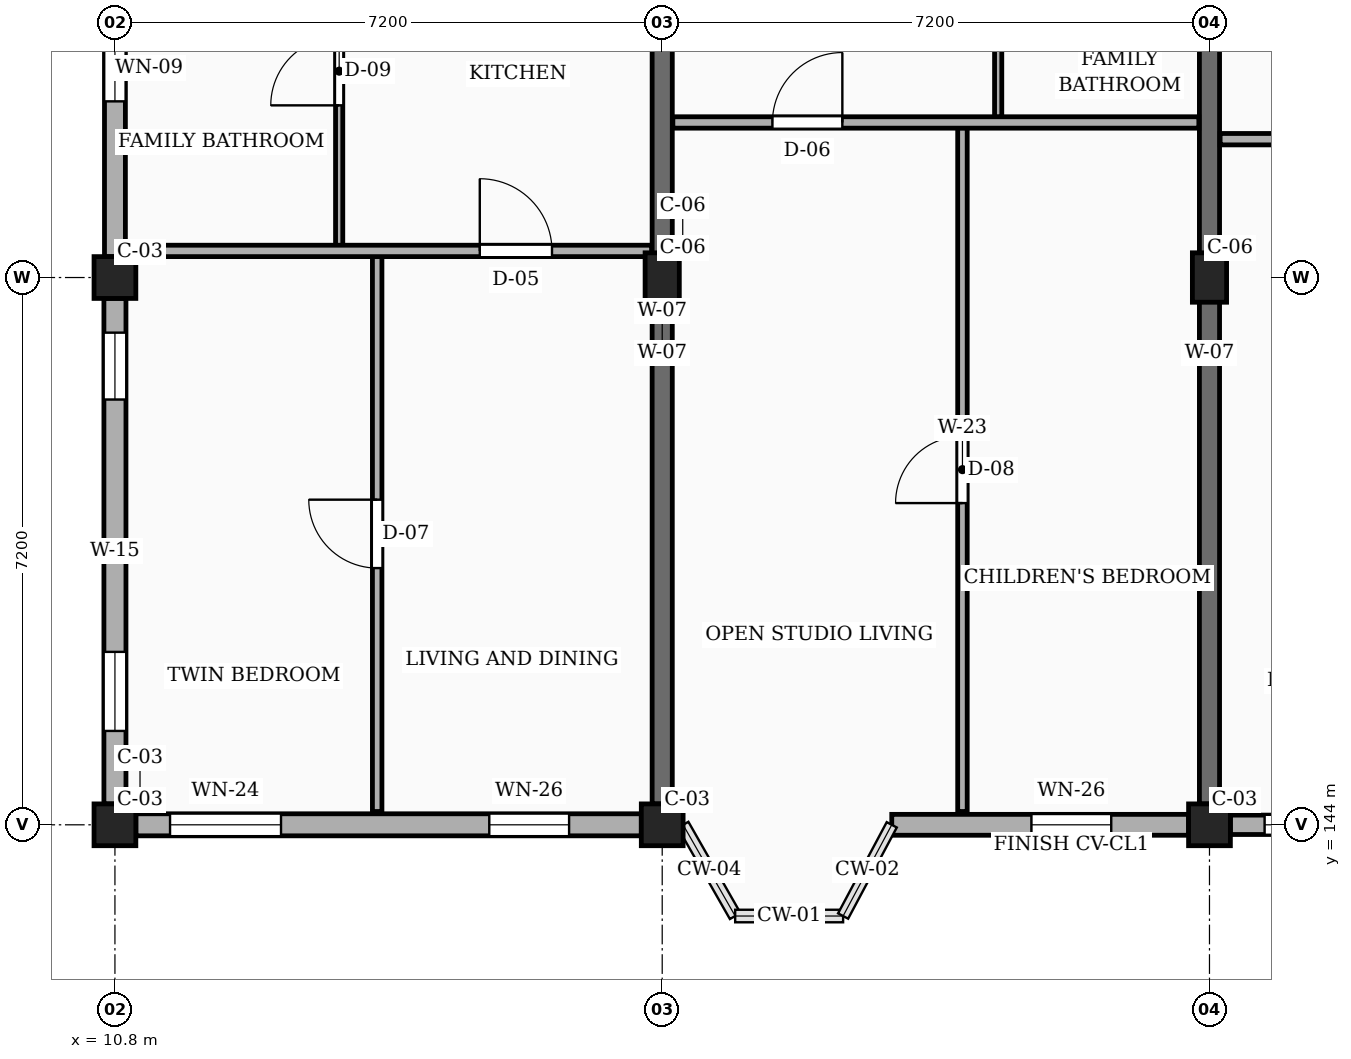
"""IFC4 building model, lengths in metres.
Left out: names, types, materials, properties, quantities, classifications, styles, units other than length and angle.
Written with IfcOpenShell. Run it as: python <this file> out.ifc"""

import sys

from ifc_helpers import new_model, si_unit, direction, frame, frame_2d, origin, origin_2d, place, context, subcontext, project, spatial, rectangle, extrude, element, fill, save


model = new_model("IFC4")
c1 = context("Model", 3, precision=1e-05, world=origin(), true_north=direction((0.0, 1.0)))
c2 = subcontext(c1, "Body", "Model", "MODEL_VIEW")
j1 = project(units=[si_unit("LENGTHUNIT", "METRE"), si_unit("PLANEANGLEUNIT", "RADIAN")], contexts=[c1])
p1 = place(None, origin())
s1 = spatial("IfcSite", under=j1, at=p1, CompositionType="ELEMENT")
p2 = place(p1, origin())
s2 = spatial("IfcBuilding", under=s1, at=p2, CompositionType="ELEMENT")
p3 = place(p2, frame((0.0, 0.0, 10.8)))
s3 = spatial("IfcBuildingStorey", under=s2, at=p3, CompositionType="ELEMENT", Elevation=10.8)
for number, where, z_axis, x_axis in (
    (1, (10.8, 144.0, 0.0), (0.0, 0.0, 1.0), (1.0, 0.0, 0.0)),
    (2, (10.8, 151.2, 0.0), (0.0, 0.0, 1.0), (1.0, 0.0, 0.0)),
    (3, (18.0, 144.0, 0.0), (0.0, 0.0, 1.0), (1.0, 0.0, 0.0)),
):
    element("IfcColumn", number, at=place(p3, frame(where, z_axis=z_axis, x_axis=x_axis)), inside=s3, PredefinedType="COLUMN", context=c2, shape_type="SweptSolid", body=[
        extrude(rectangle(XDim=0.55, YDim=0.55, at=origin_2d()), origin(), (0.0, 0.0, 1.0), 3.15),
    ])
p4 = place(p3, frame((18.0, 151.2, 0.0), z_axis=(0.0, 0.0, 1.0), x_axis=(1.0, 0.0, 0.0)))
e4 = element("IfcColumn", 4, at=p4, inside=s3, PredefinedType="COLUMN", context=c2, shape_type="SweptSolid", body=[
    extrude(rectangle(XDim=0.45, YDim=0.65, at=origin_2d()), origin(), (0.0, 0.0, 1.0), 3.15),
])
p5 = place(p3, frame((25.2, 144.0, 0.0), z_axis=(0.0, 0.0, 1.0), x_axis=(1.0, 0.0, 0.0)))
e5 = element("IfcColumn", 5, at=p5, inside=s3, PredefinedType="COLUMN", context=c2, shape_type="SweptSolid", body=[
    extrude(rectangle(XDim=0.55, YDim=0.55, at=origin_2d()), origin(), (0.0, 0.0, 1.0), 3.15),
])
p6 = place(p3, frame((25.2, 151.2, 0.0), z_axis=(0.0, 0.0, 1.0), x_axis=(1.0, 0.0, 0.0)))
e6 = element("IfcColumn", 6, at=p6, inside=s3, PredefinedType="COLUMN", context=c2, shape_type="SweptSolid", body=[
    extrude(rectangle(XDim=0.45, YDim=0.65, at=origin_2d()), origin(), (0.0, 0.0, 1.0), 3.15),
])
for number, where, z_axis, x_axis in (
    (7, (18.0, 144.275, 0.0), (0.0, 0.0, 1.0), (0.0, 1.0, 0.0)),
    (8, (25.2, 144.275, 0.0), (0.0, 0.0, 1.0), (0.0, 1.0, 0.0)),
):
    element("IfcWall", number, at=place(p3, frame(where, z_axis=z_axis, x_axis=x_axis)), inside=s3, PredefinedType="SOLIDWALL", context=c2, shape_type="SweptSolid", body=[
        extrude(rectangle(XDim=11.875, YDim=0.265, at=frame_2d((5.938, 0.0))), origin(), (0.0, 0.0, 1.0), 2.185),
    ])
p7 = place(p3, frame((11.075, 144.0, 0.0), z_axis=(0.0, 0.0, 1.0), x_axis=(1.0, 0.0, 0.0)))
e9 = element("IfcWall", 9, at=p7, inside=s3, PredefinedType="SOLIDWALL", context=c2, shape_type="SweptSolid", body=[
    extrude(rectangle(XDim=6.65, YDim=0.29, at=frame_2d((3.325, 0.0))), origin(), (0.0, 0.0, 1.0), 2.455),
])
p8 = place(p7, frame((0.45, 0.0, 0.78)))
e10 = element("IfcOpeningElement", 10, at=p8, cuts=e9, PredefinedType="OPENING", context=c2, shape_type="SweptSolid", body=[
    extrude(rectangle(XDim=1.46, YDim=1.36, at=frame_2d((0.73, 0.68))), frame((0.0, 0.155, 0.0), z_axis=(0.0, -1.0, 0.0), x_axis=(1.0, 0.0, 0.0)), (0.0, 0.0, 1.0), 0.31),
])
p9 = place(p7, frame((4.65, 0.0, 0.78)))
e11 = element("IfcOpeningElement", 11, at=p9, cuts=e9, PredefinedType="OPENING", context=c2, shape_type="SweptSolid", body=[
    extrude(rectangle(XDim=1.05, YDim=1.44, at=frame_2d((0.525, 0.72))), frame((0.0, 0.155, 0.0), z_axis=(0.0, -1.0, 0.0), x_axis=(1.0, 0.0, 0.0)), (0.0, 0.0, 1.0), 0.31),
])
p10 = place(p3, frame((21.02, 144.0, 0.0), z_axis=(0.0, 0.0, 1.0), x_axis=(1.0, 0.0, 0.0)))
e12 = element("IfcWall", 12, at=p10, inside=s3, PredefinedType="SOLIDWALL", context=c2, shape_type="SweptSolid", body=[
    extrude(rectangle(XDim=3.905, YDim=0.275, at=frame_2d((1.953, 0.0))), origin(), (0.0, 0.0, 1.0), 2.455),
])
p11 = place(p10, frame((1.837, 0.0, 0.78)))
e13 = element("IfcOpeningElement", 13, at=p11, cuts=e12, PredefinedType="OPENING", context=c2, shape_type="SweptSolid", body=[
    extrude(rectangle(XDim=1.05, YDim=1.44, at=frame_2d((0.525, 0.72))), frame((0.0, 0.147, 0.0), z_axis=(0.0, -1.0, 0.0), x_axis=(1.0, 0.0, 0.0)), (0.0, 0.0, 1.0), 0.295),
])
p12 = place(p3, frame((25.475, 144.0, 0.0), z_axis=(0.0, 0.0, 1.0), x_axis=(1.0, 0.0, 0.0)))
e14 = element("IfcWall", 14, at=p12, inside=s3, PredefinedType="SOLIDWALL", context=c2, shape_type="SweptSolid", body=[
    extrude(rectangle(XDim=6.65, YDim=0.255, at=frame_2d((3.325, 0.0))), origin(), (0.0, 0.0, 1.0), 2.455),
])
p13 = place(p12, frame((0.45, 0.0, 0.78)))
e15 = element("IfcOpeningElement", 15, at=p13, cuts=e14, PredefinedType="OPENING", context=c2, shape_type="SweptSolid", body=[
    extrude(rectangle(XDim=1.15, YDim=1.44, at=frame_2d((0.575, 0.72))), frame((0.0, 0.137, 0.0), z_axis=(0.0, -1.0, 0.0), x_axis=(1.0, 0.0, 0.0)), (0.0, 0.0, 1.0), 0.275),
])
p14 = place(p12, frame((4.65, 0.0, 0.78)))
e16 = element("IfcOpeningElement", 16, at=p14, cuts=e14, PredefinedType="OPENING", context=c2, shape_type="SweptSolid", body=[
    extrude(rectangle(XDim=1.35, YDim=1.44, at=frame_2d((0.675, 0.72))), frame((0.0, 0.137, 0.0), z_axis=(0.0, -1.0, 0.0), x_axis=(1.0, 0.0, 0.0)), (0.0, 0.0, 1.0), 0.275),
])
p15 = place(p3, frame((10.8, 158.125, 0.0), z_axis=(0.0, 0.0, 1.0), x_axis=(0.0, -1.0, 0.0)))
e17 = element("IfcWall", 17, at=p15, inside=s3, PredefinedType="SOLIDWALL", context=c2, shape_type="SweptSolid", body=[
    extrude(rectangle(XDim=6.65, YDim=0.275, at=frame_2d((3.325, 0.0))), origin(), (0.0, 0.0, 1.0), 2.455),
])
p16 = place(p15, frame((0.462, 0.0, 0.78)))
e18 = element("IfcOpeningElement", 18, at=p16, cuts=e17, PredefinedType="OPENING", context=c2, shape_type="SweptSolid", body=[
    extrude(rectangle(XDim=1.04, YDim=1.26, at=frame_2d((0.52, 0.63))), frame((0.0, 0.147, 0.0), z_axis=(0.0, -1.0, 0.0), x_axis=(1.0, 0.0, 0.0)), (0.0, 0.0, 1.0), 0.295),
])
p17 = place(p15, frame((3.728, 0.0, 0.78)))
e19 = element("IfcOpeningElement", 19, at=p17, cuts=e17, PredefinedType="OPENING", context=c2, shape_type="SweptSolid", body=[
    extrude(rectangle(XDim=0.88, YDim=1.26, at=frame_2d((0.44, 0.63))), frame((0.0, 0.147, 0.0), z_axis=(0.0, -1.0, 0.0), x_axis=(1.0, 0.0, 0.0)), (0.0, 0.0, 1.0), 0.295),
])
p18 = place(p3, frame((10.8, 150.925, 0.0), z_axis=(0.0, 0.0, 1.0), x_axis=(0.0, -1.0, 0.0)))
e20 = element("IfcWall", 20, at=p18, inside=s3, PredefinedType="SOLIDWALL", context=c2, shape_type="SweptSolid", body=[
    extrude(rectangle(XDim=6.65, YDim=0.29, at=frame_2d((3.325, 0.0))), origin(), (0.0, 0.0, 1.0), 2.455),
])
p19 = place(p18, frame((0.45, 0.0, 0.78)))
e21 = element("IfcOpeningElement", 21, at=p19, cuts=e20, PredefinedType="OPENING", context=c2, shape_type="SweptSolid", body=[
    extrude(rectangle(XDim=0.88, YDim=1.26, at=frame_2d((0.44, 0.63))), frame((0.0, 0.155, 0.0), z_axis=(0.0, -1.0, 0.0), x_axis=(1.0, 0.0, 0.0)), (0.0, 0.0, 1.0), 0.31),
])
p20 = place(p18, frame((4.65, 0.0, 0.78)))
e22 = element("IfcOpeningElement", 22, at=p20, cuts=e20, PredefinedType="OPENING", context=c2, shape_type="SweptSolid", body=[
    extrude(rectangle(XDim=1.04, YDim=1.26, at=frame_2d((0.52, 0.63))), frame((0.0, 0.155, 0.0), z_axis=(0.0, -1.0, 0.0), x_axis=(1.0, 0.0, 0.0)), (0.0, 0.0, 1.0), 0.31),
])
p21 = place(p3, frame((14.25, 144.175, 0.0), z_axis=(0.0, 0.0, 1.0), x_axis=(0.0, 1.0, 0.0)))
e23 = element("IfcWall", 23, at=p21, inside=s3, PredefinedType="PARTITIONING", context=c2, shape_type="SweptSolid", body=[
    extrude(rectangle(XDim=7.305, YDim=0.125, at=frame_2d((3.652, 0.0))), origin(), (0.0, 0.0, 1.0), 2.32),
])
p22 = place(p21, frame((3.202, 0.0, 0.0)))
e24 = element("IfcOpeningElement", 24, at=p22, cuts=e23, PredefinedType="OPENING", context=c2, shape_type="SweptSolid", body=[
    extrude(rectangle(XDim=0.9, YDim=2.1, at=frame_2d((0.45, 1.05))), frame((0.0, 0.073, 0.0), z_axis=(0.0, -1.0, 0.0), x_axis=(1.0, 0.0, 0.0)), (0.0, 0.0, 1.0), 0.145),
])
p23 = place(p3, frame((13.75, 151.62, 0.0), z_axis=(0.0, 0.0, 1.0), x_axis=(0.0, 1.0, 0.0)))
e25 = element("IfcWall", 25, at=p23, inside=s3, PredefinedType="PARTITIONING", context=c2, shape_type="SweptSolid", body=[
    extrude(rectangle(XDim=4.59, YDim=0.095, at=frame_2d((2.295, 0.0))), origin(), (0.0, 0.0, 1.0), 2.32),
])
p24 = place(p23, frame((1.845, 0.0, 0.0)))
e26 = element("IfcOpeningElement", 26, at=p24, cuts=e25, PredefinedType="OPENING", context=c2, shape_type="SweptSolid", body=[
    extrude(rectangle(XDim=0.9, YDim=2.05, at=frame_2d((0.45, 1.025))), frame((0.0, 0.058, 0.0), z_axis=(0.0, -1.0, 0.0), x_axis=(1.0, 0.0, 0.0)), (0.0, 0.0, 1.0), 0.115),
])
p25 = place(p3, frame((10.975, 151.55, 0.0), z_axis=(0.0, 0.0, 1.0), x_axis=(1.0, 0.0, 0.0)))
e27 = element("IfcWall", 27, at=p25, inside=s3, PredefinedType="PARTITIONING", context=c2, shape_type="SweptSolid", body=[
    extrude(rectangle(XDim=6.885, YDim=0.15, at=frame_2d((3.442, 0.0))), origin(), (0.0, 0.0, 1.0), 2.32),
])
p26 = place(p25, frame((4.625, 0.0, 0.0)))
e28 = element("IfcOpeningElement", 28, at=p26, cuts=e27, PredefinedType="OPENING", context=c2, shape_type="SweptSolid", body=[
    extrude(rectangle(XDim=0.95, YDim=2.1, at=frame_2d((0.475, 1.05))), frame((0.0, 0.085, 0.0), z_axis=(0.0, -1.0, 0.0), x_axis=(1.0, 0.0, 0.0)), (0.0, 0.0, 1.0), 0.17),
])
p27 = place(p3, frame((21.95, 144.175, 0.0), z_axis=(0.0, 0.0, 1.0), x_axis=(0.0, 1.0, 0.0)))
e29 = element("IfcWall", 29, at=p27, inside=s3, PredefinedType="PARTITIONING", context=c2, shape_type="SweptSolid", body=[
    extrude(rectangle(XDim=8.995, YDim=0.125, at=frame_2d((4.498, 0.0))), origin(), (0.0, 0.0, 1.0), 2.32),
])
p28 = place(p27, frame((4.058, 0.0, 0.0)))
e30 = element("IfcOpeningElement", 30, at=p28, cuts=e29, PredefinedType="OPENING", context=c2, shape_type="SweptSolid", body=[
    extrude(rectangle(XDim=0.88, YDim=2.08, at=frame_2d((0.44, 1.04))), frame((0.0, 0.073, 0.0), z_axis=(0.0, -1.0, 0.0), x_axis=(1.0, 0.0, 0.0)), (0.0, 0.0, 1.0), 0.145),
])
p29 = place(p3, frame((22.42, 153.31, 0.0), z_axis=(0.0, 0.0, 1.0), x_axis=(0.0, 1.0, 0.0)))
e31 = element("IfcWall", 31, at=p29, inside=s3, PredefinedType="PARTITIONING", context=c2, shape_type="SweptSolid", body=[
    extrude(rectangle(XDim=2.9, YDim=0.095, at=frame_2d((1.45, 0.0))), origin(), (0.0, 0.0, 1.0), 2.32),
])
p30 = place(p29, frame((1.015, 0.0, 0.0)))
e32 = element("IfcOpeningElement", 32, at=p30, cuts=e31, PredefinedType="OPENING", context=c2, shape_type="SweptSolid", body=[
    extrude(rectangle(XDim=0.87, YDim=2.05, at=frame_2d((0.435, 1.025))), frame((0.0, 0.058, 0.0), z_axis=(0.0, -1.0, 0.0), x_axis=(1.0, 0.0, 0.0)), (0.0, 0.0, 1.0), 0.115),
])
p31 = place(p3, frame((18.14, 153.24, 0.0), z_axis=(0.0, 0.0, 1.0), x_axis=(1.0, 0.0, 0.0)))
e33 = element("IfcWall", 33, at=p31, inside=s3, PredefinedType="PARTITIONING", context=c2, shape_type="SweptSolid", body=[
    extrude(rectangle(XDim=6.92, YDim=0.15, at=frame_2d((3.46, 0.0))), origin(), (0.0, 0.0, 1.0), 2.32),
])
p32 = place(p31, frame((1.31, 0.0, 0.0)))
e34 = element("IfcOpeningElement", 34, at=p32, cuts=e33, PredefinedType="OPENING", context=c2, shape_type="SweptSolid", body=[
    extrude(rectangle(XDim=0.92, YDim=2.1, at=frame_2d((0.46, 1.05))), frame((0.0, 0.085, 0.0), z_axis=(0.0, -1.0, 0.0), x_axis=(1.0, 0.0, 0.0)), (0.0, 0.0, 1.0), 0.17),
])
p33 = place(p3, frame((25.34, 153.02, 0.0), z_axis=(0.0, 0.0, 1.0), x_axis=(1.0, 0.0, 0.0)))
e35 = element("IfcWall", 35, at=p33, inside=s3, PredefinedType="PARTITIONING", context=c2, shape_type="SweptSolid", body=[
    extrude(rectangle(XDim=6.92, YDim=0.15, at=frame_2d((3.46, 0.0))), origin(), (0.0, 0.0, 1.0), 2.32),
])
p34 = place(p33, frame((1.31, 0.0, 0.0)))
e36 = element("IfcOpeningElement", 36, at=p34, cuts=e35, PredefinedType="OPENING", context=c2, shape_type="SweptSolid", body=[
    extrude(rectangle(XDim=0.95, YDim=2.1, at=frame_2d((0.475, 1.05))), frame((0.0, 0.085, 0.0), z_axis=(0.0, -1.0, 0.0), x_axis=(1.0, 0.0, 0.0)), (0.0, 0.0, 1.0), 0.17),
])
p35 = place(p8, origin())
e37 = element("IfcWindow", 37, at=p35, inside=s3, PartitioningType="SINGLE_PANEL", PredefinedType="WINDOW", context=c2, shape_type="SweptSolid", body=[
    extrude(rectangle(XDim=1.46, YDim=1.36, at=frame_2d((0.73, 0.68))), frame((0.0, 0.03, 0.0), z_axis=(0.0, -1.0, 0.0), x_axis=(1.0, 0.0, 0.0)), (0.0, 0.0, 1.0), 0.06),
])
fill(e10, e37)
p36 = place(p9, origin())
e38 = element("IfcWindow", 38, at=p36, inside=s3, PartitioningType="SINGLE_PANEL", PredefinedType="WINDOW", context=c2, shape_type="SweptSolid", body=[
    extrude(rectangle(XDim=1.05, YDim=1.44, at=frame_2d((0.525, 0.72))), frame((0.0, 0.03, 0.0), z_axis=(0.0, -1.0, 0.0), x_axis=(1.0, 0.0, 0.0)), (0.0, 0.0, 1.0), 0.06),
])
fill(e11, e38)
p37 = place(p11, origin())
e39 = element("IfcWindow", 39, at=p37, inside=s3, PartitioningType="SINGLE_PANEL", PredefinedType="WINDOW", context=c2, shape_type="SweptSolid", body=[
    extrude(rectangle(XDim=1.05, YDim=1.44, at=frame_2d((0.525, 0.72))), frame((0.0, 0.03, 0.0), z_axis=(0.0, -1.0, 0.0), x_axis=(1.0, 0.0, 0.0)), (0.0, 0.0, 1.0), 0.06),
])
fill(e13, e39)
p38 = place(p13, origin())
e40 = element("IfcWindow", 40, at=p38, inside=s3, PartitioningType="SINGLE_PANEL", PredefinedType="WINDOW", context=c2, shape_type="SweptSolid", body=[
    extrude(rectangle(XDim=1.15, YDim=1.44, at=frame_2d((0.575, 0.72))), frame((0.0, 0.03, 0.0), z_axis=(0.0, -1.0, 0.0), x_axis=(1.0, 0.0, 0.0)), (0.0, 0.0, 1.0), 0.06),
])
fill(e15, e40)
p39 = place(p17, origin())
e41 = element("IfcWindow", 41, at=p39, inside=s3, PartitioningType="SINGLE_PANEL", PredefinedType="WINDOW", context=c2, shape_type="SweptSolid", body=[
    extrude(rectangle(XDim=0.88, YDim=1.26, at=frame_2d((0.44, 0.63))), frame((0.0, 0.03, 0.0), z_axis=(0.0, -1.0, 0.0), x_axis=(1.0, 0.0, 0.0)), (0.0, 0.0, 1.0), 0.06),
])
fill(e19, e41)
p40 = place(p19, origin())
e42 = element("IfcWindow", 42, at=p40, inside=s3, PartitioningType="SINGLE_PANEL", PredefinedType="WINDOW", context=c2, shape_type="SweptSolid", body=[
    extrude(rectangle(XDim=0.88, YDim=1.26, at=frame_2d((0.44, 0.63))), frame((0.0, 0.03, 0.0), z_axis=(0.0, -1.0, 0.0), x_axis=(1.0, 0.0, 0.0)), (0.0, 0.0, 1.0), 0.06),
])
fill(e21, e42)
p41 = place(p20, origin())
e43 = element("IfcWindow", 43, at=p41, inside=s3, PartitioningType="SINGLE_PANEL", PredefinedType="WINDOW", context=c2, shape_type="SweptSolid", body=[
    extrude(rectangle(XDim=1.04, YDim=1.26, at=frame_2d((0.52, 0.63))), frame((0.0, 0.03, 0.0), z_axis=(0.0, -1.0, 0.0), x_axis=(1.0, 0.0, 0.0)), (0.0, 0.0, 1.0), 0.06),
])
fill(e22, e43)
p42 = place(p22, origin())
e44 = element("IfcDoor", 44, at=p42, inside=s3, OperationType="SINGLE_SWING_RIGHT", PredefinedType="DOOR", context=c2, shape_type="SweptSolid", body=[
    extrude(rectangle(XDim=0.9, YDim=2.1, at=frame_2d((0.45, 1.05))), frame((0.0, 0.025, 0.0), z_axis=(0.0, -1.0, 0.0), x_axis=(1.0, 0.0, 0.0)), (0.0, 0.0, 1.0), 0.05),
])
fill(e24, e44)
p43 = place(p24, origin())
e45 = element("IfcDoor", 45, at=p43, inside=s3, OperationType="SINGLE_SWING_LEFT", PredefinedType="DOOR", context=c2, shape_type="SweptSolid", body=[
    extrude(rectangle(XDim=0.9, YDim=2.05, at=frame_2d((0.45, 1.025))), frame((0.0, 0.025, 0.0), z_axis=(0.0, -1.0, 0.0), x_axis=(1.0, 0.0, 0.0)), (0.0, 0.0, 1.0), 0.05),
])
fill(e26, e45)
p44 = place(p26, origin())
e46 = element("IfcDoor", 46, at=p44, inside=s3, OperationType="SINGLE_SWING_LEFT", PredefinedType="DOOR", context=c2, shape_type="SweptSolid", body=[
    extrude(rectangle(XDim=0.95, YDim=2.1, at=frame_2d((0.475, 1.05))), frame((0.0, 0.025, 0.0), z_axis=(0.0, -1.0, 0.0), x_axis=(1.0, 0.0, 0.0)), (0.0, 0.0, 1.0), 0.05),
])
fill(e28, e46)
p45 = place(p28, origin())
e47 = element("IfcDoor", 47, at=p45, inside=s3, OperationType="SINGLE_SWING_LEFT", PredefinedType="DOOR", context=c2, shape_type="SweptSolid", body=[
    extrude(rectangle(XDim=0.88, YDim=2.08, at=frame_2d((0.44, 1.04))), frame((0.0, 0.025, 0.0), z_axis=(0.0, -1.0, 0.0), x_axis=(1.0, 0.0, 0.0)), (0.0, 0.0, 1.0), 0.05),
])
fill(e30, e47)
p46 = place(p32, origin())
e48 = element("IfcDoor", 48, at=p46, inside=s3, OperationType="SINGLE_SWING_RIGHT", PredefinedType="DOOR", context=c2, shape_type="SweptSolid", body=[
    extrude(rectangle(XDim=0.92, YDim=2.1, at=frame_2d((0.46, 1.05))), frame((0.0, 0.025, 0.0), z_axis=(0.0, -1.0, 0.0), x_axis=(1.0, 0.0, 0.0)), (0.0, 0.0, 1.0), 0.05),
])
fill(e34, e48)
save(model, sys.argv[1])
